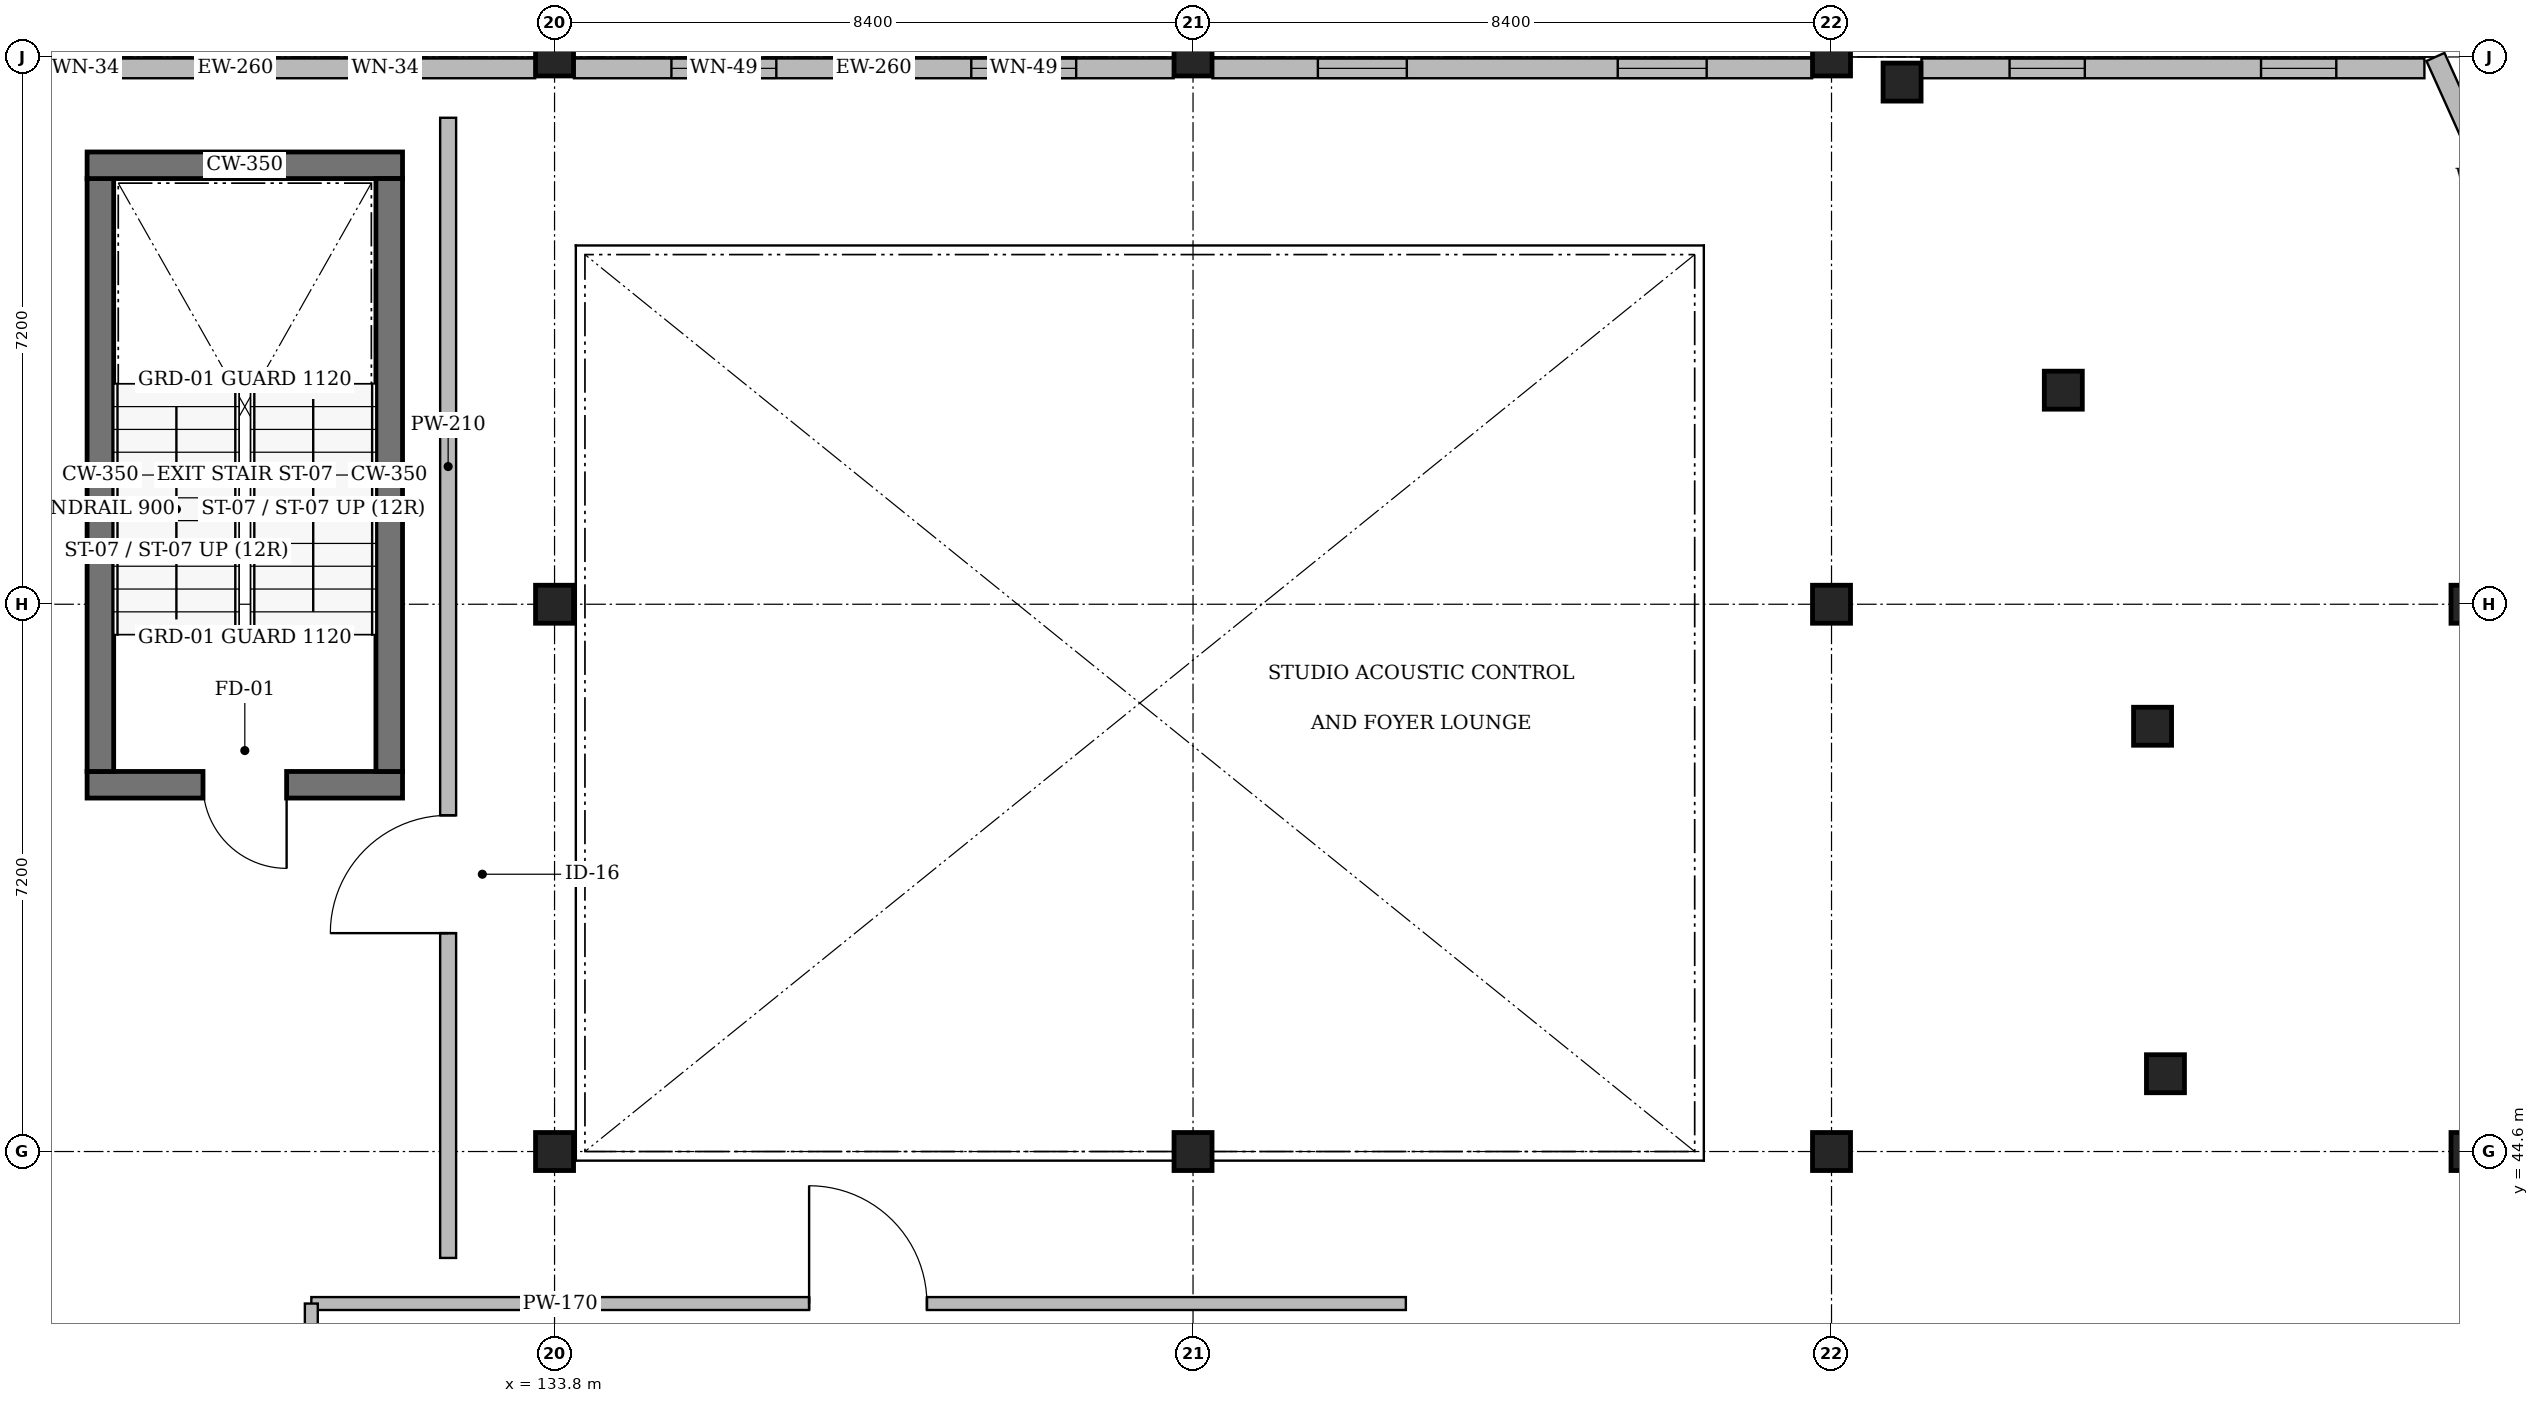
"""IFC4 building model, lengths in metres.
Left out: names, types, materials, properties, quantities, classifications, styles, units other than length and angle.
Written with IfcOpenShell. Run it as: python <this file> out.ifc"""

import sys

from ifc_helpers import new_model, si_unit, direction, frame, frame_2d, origin, origin_2d, place, context, subcontext, project, spatial, rectangle, extrude, element, fill, save


model = new_model("IFC4")
c1 = context("Model", 3, precision=1e-05, world=origin(), true_north=direction((0.0, 1.0)))
c2 = subcontext(c1, "Body", "Model", "MODEL_VIEW")
j1 = project(units=[si_unit("LENGTHUNIT", "METRE"), si_unit("PLANEANGLEUNIT", "RADIAN")], contexts=[c1])
p1 = place(None, origin())
s1 = spatial("IfcSite", under=j1, at=p1, CompositionType="ELEMENT")
p2 = place(p1, origin())
s2 = spatial("IfcBuilding", under=s1, at=p2, CompositionType="ELEMENT")
p3 = place(p2, frame((0.0, 0.0, 4.8)))
s3 = spatial("IfcBuildingStorey", under=s2, at=p3, CompositionType="ELEMENT", Elevation=4.8)
for number, where, z_axis, x_axis in (
    (1, (133.8, 44.6, 0.0), (0.0, 0.0, 1.0), (1.0, 0.0, 0.0)),
    (2, (133.8, 51.8, 0.0), (0.0, 0.0, 1.0), (1.0, 0.0, 0.0)),
    (3, (133.8, 59.0, 0.0), (0.0, 0.0, 1.0), (1.0, 0.0, 0.0)),
    (4, (142.2, 44.6, 0.0), (0.0, 0.0, 1.0), (1.0, 0.0, 0.0)),
    (5, (142.2, 59.0, 0.0), (0.0, 0.0, 1.0), (1.0, 0.0, 0.0)),
    (6, (150.6, 44.6, 0.0), (0.0, 0.0, 1.0), (1.0, 0.0, 0.0)),
    (7, (150.6, 51.8, 0.0), (0.0, 0.0, 1.0), (1.0, 0.0, 0.0)),
    (8, (150.6, 59.0, 0.0), (0.0, 0.0, 1.0), (1.0, 0.0, 0.0)),
    (9, (159.0, 44.6, 0.0), (0.0, 0.0, 1.0), (1.0, 0.0, 0.0)),
    (10, (159.0, 51.8, 0.0), (0.0, 0.0, 1.0), (1.0, 0.0, 0.0)),
    (11, (151.528, 58.669, 0.0), (0.0, 0.0, 1.0), (1.0, 0.0, 0.0)),
    (12, (153.649, 54.616, 0.0), (0.0, 0.0, 1.0), (1.0, 0.0, 0.0)),
    (13, (154.824, 50.195, 0.0), (0.0, 0.0, 1.0), (1.0, 0.0, 0.0)),
    (14, (154.993, 45.623, 0.0), (0.0, 0.0, 1.0), (1.0, 0.0, 0.0)),
):
    element("IfcColumn", number, at=place(p3, frame(where, z_axis=z_axis, x_axis=x_axis)), inside=s3, PredefinedType="COLUMN", context=c2, shape_type="SweptSolid", body=[
        extrude(rectangle(XDim=0.5, YDim=0.5, at=origin_2d()), origin(), (0.0, 0.0, 1.0), 4.2),
    ])
p4 = place(p3, frame((131.8, 49.425, 0.0), z_axis=(0.0, 0.0, 1.0), x_axis=(-1.0, 0.0, 0.0)))
e15 = element("IfcWall", 15, at=p4, inside=s3, PredefinedType="SOLIDWALL", context=c2, shape_type="SweptSolid", body=[
    extrude(rectangle(XDim=4.15, YDim=0.35, at=frame_2d((2.075, 0.0))), origin(), (0.0, 0.0, 1.0), 4.2),
])
p5 = place(p4, frame((1.525, 0.0, 0.0)))
e16 = element("IfcOpeningElement", 16, at=p5, cuts=e15, PredefinedType="OPENING", context=c2, shape_type="SweptSolid", body=[
    extrude(rectangle(XDim=1.1, YDim=2.15, at=frame_2d((0.55, 1.075))), frame((0.0, 0.195, 0.0), z_axis=(0.0, -1.0, 0.0), x_axis=(1.0, 0.0, 0.0)), (0.0, 0.0, 1.0), 0.39),
])
p6 = place(p3, frame((127.825, 49.6, 0.0), z_axis=(0.0, 0.0, 1.0), x_axis=(0.0, 1.0, 0.0)))
e17 = element("IfcWall", 17, at=p6, inside=s3, PredefinedType="SOLIDWALL", context=c2, shape_type="SweptSolid", body=[
    extrude(rectangle(XDim=7.8, YDim=0.35, at=frame_2d((3.9, 0.0))), origin(), (0.0, 0.0, 1.0), 4.2),
])
p7 = place(p3, frame((127.65, 57.575, 0.0), z_axis=(0.0, 0.0, 1.0), x_axis=(1.0, 0.0, 0.0)))
e18 = element("IfcWall", 18, at=p7, inside=s3, PredefinedType="SOLIDWALL", context=c2, shape_type="SweptSolid", body=[
    extrude(rectangle(XDim=4.15, YDim=0.35, at=frame_2d((2.075, 0.0))), origin(), (0.0, 0.0, 1.0), 4.2),
])
p8 = place(p3, frame((131.625, 57.4, 0.0), z_axis=(0.0, 0.0, 1.0), x_axis=(0.0, -1.0, 0.0)))
e19 = element("IfcWall", 19, at=p8, inside=s3, PredefinedType="SOLIDWALL", context=c2, shape_type="SweptSolid", body=[
    extrude(rectangle(XDim=7.8, YDim=0.35, at=frame_2d((3.9, 0.0))), origin(), (0.0, 0.0, 1.0), 4.2),
])
p9 = place(p3, frame((161.385, 52.7, 0.0), z_axis=(0.0, 0.0, 1.0), x_axis=(-0.410843511641, 0.911705878528, 0.0)))
e20 = element("IfcWall", 20, at=p9, inside=s3, PredefinedType="SOLIDWALL", context=c2, shape_type="SweptSolid", body=[
    extrude(rectangle(XDim=6.91, YDim=0.26, at=frame_2d((3.455, 0.0))), origin(), (0.0, 0.0, 1.0), 3.94),
])
p10 = place(p9, frame((1.068, 0.0, 0.95)))
e21 = element("IfcOpeningElement", 21, at=p10, cuts=e20, PredefinedType="OPENING", context=c2, shape_type="SweptSolid", body=[
    extrude(rectangle(XDim=1.32, YDim=1.9, at=frame_2d((0.66, 0.95))), frame((0.0, 0.15, 0.0), z_axis=(0.0, -1.0, 0.0), x_axis=(1.0, 0.0, 0.0)), (0.0, 0.0, 1.0), 0.3),
])
p11 = place(p9, frame((4.523, 0.0, 0.95)))
e22 = element("IfcOpeningElement", 22, at=p11, cuts=e20, PredefinedType="OPENING", context=c2, shape_type="SweptSolid", body=[
    extrude(rectangle(XDim=1.32, YDim=1.9, at=frame_2d((0.66, 0.95))), frame((0.0, 0.15, 0.0), z_axis=(0.0, -1.0, 0.0), x_axis=(1.0, 0.0, 0.0)), (0.0, 0.0, 1.0), 0.3),
])
p12 = place(p3, frame((125.655, 58.85, 0.0), z_axis=(0.0, 0.0, 1.0), x_axis=(1.0, 0.0, 0.0)))
e23 = element("IfcWall", 23, at=p12, inside=s3, PredefinedType="SOLIDWALL", context=c2, shape_type="SweptSolid", body=[
    extrude(rectangle(XDim=7.89, YDim=0.26, at=frame_2d((3.945, 0.0))), origin(), (0.0, 0.0, 1.0), 3.273),
])
p13 = place(p12, frame((1.508, 0.0, 0.95)))
e24 = element("IfcOpeningElement", 24, at=p13, cuts=e23, PredefinedType="OPENING", context=c2, shape_type="SweptSolid", body=[
    extrude(rectangle(XDim=0.93, YDim=1.55, at=frame_2d((0.465, 0.775))), frame((0.0, 0.15, 0.0), z_axis=(0.0, -1.0, 0.0), x_axis=(1.0, 0.0, 0.0)), (0.0, 0.0, 1.0), 0.3),
])
p14 = place(p12, frame((5.452, 0.0, 0.95)))
e25 = element("IfcOpeningElement", 25, at=p14, cuts=e23, PredefinedType="OPENING", context=c2, shape_type="SweptSolid", body=[
    extrude(rectangle(XDim=0.93, YDim=1.55, at=frame_2d((0.465, 0.775))), frame((0.0, 0.15, 0.0), z_axis=(0.0, -1.0, 0.0), x_axis=(1.0, 0.0, 0.0)), (0.0, 0.0, 1.0), 0.3),
])
p15 = place(p3, frame((134.055, 58.85, 0.0), z_axis=(0.0, 0.0, 1.0), x_axis=(1.0, 0.0, 0.0)))
e26 = element("IfcWall", 26, at=p15, inside=s3, PredefinedType="SOLIDWALL", context=c2, shape_type="SweptSolid", body=[
    extrude(rectangle(XDim=7.89, YDim=0.26, at=frame_2d((3.945, 0.0))), origin(), (0.0, 0.0, 1.0), 3.273),
])
p16 = place(p15, frame((1.282, 0.0, 0.95)))
e27 = element("IfcOpeningElement", 27, at=p16, cuts=e26, PredefinedType="OPENING", context=c2, shape_type="SweptSolid", body=[
    extrude(rectangle(XDim=1.38, YDim=1.7, at=frame_2d((0.69, 0.85))), frame((0.0, 0.15, 0.0), z_axis=(0.0, -1.0, 0.0), x_axis=(1.0, 0.0, 0.0)), (0.0, 0.0, 1.0), 0.3),
])
p17 = place(p15, frame((5.228, 0.0, 0.95)))
e28 = element("IfcOpeningElement", 28, at=p17, cuts=e26, PredefinedType="OPENING", context=c2, shape_type="SweptSolid", body=[
    extrude(rectangle(XDim=1.38, YDim=1.7, at=frame_2d((0.69, 0.85))), frame((0.0, 0.15, 0.0), z_axis=(0.0, -1.0, 0.0), x_axis=(1.0, 0.0, 0.0)), (0.0, 0.0, 1.0), 0.3),
])
p18 = place(p3, frame((142.455, 58.85, 0.0), z_axis=(0.0, 0.0, 1.0), x_axis=(1.0, 0.0, 0.0)))
e29 = element("IfcWall", 29, at=p18, inside=s3, PredefinedType="SOLIDWALL", context=c2, shape_type="SweptSolid", body=[
    extrude(rectangle(XDim=7.89, YDim=0.26, at=frame_2d((3.945, 0.0))), origin(), (0.0, 0.0, 1.0), 3.273),
])
p19 = place(p18, frame((1.387, 0.0, 0.95)))
e30 = element("IfcOpeningElement", 30, at=p19, cuts=e29, PredefinedType="OPENING", context=c2, shape_type="SweptSolid", body=[
    extrude(rectangle(XDim=1.17, YDim=1.85, at=frame_2d((0.585, 0.925))), frame((0.0, 0.15, 0.0), z_axis=(0.0, -1.0, 0.0), x_axis=(1.0, 0.0, 0.0)), (0.0, 0.0, 1.0), 0.3),
])
p20 = place(p18, frame((5.333, 0.0, 0.95)))
e31 = element("IfcOpeningElement", 31, at=p20, cuts=e29, PredefinedType="OPENING", context=c2, shape_type="SweptSolid", body=[
    extrude(rectangle(XDim=1.17, YDim=1.85, at=frame_2d((0.585, 0.925))), frame((0.0, 0.15, 0.0), z_axis=(0.0, -1.0, 0.0), x_axis=(1.0, 0.0, 0.0)), (0.0, 0.0, 1.0), 0.3),
])
p21 = place(p3, frame((151.783, 58.85, 0.0), z_axis=(0.0, 0.0, 1.0), x_axis=(1.0, 0.0, 0.0)))
e32 = element("IfcWall", 32, at=p21, inside=s3, PredefinedType="SOLIDWALL", context=c2, shape_type="SweptSolid", body=[
    extrude(rectangle(XDim=6.617, YDim=0.26, at=frame_2d((3.308, 0.0))), origin(), (0.0, 0.0, 1.0), 3.94),
])
p22 = place(p21, frame((1.159, 0.0, 0.95)))
e33 = element("IfcOpeningElement", 33, at=p22, cuts=e32, PredefinedType="OPENING", context=c2, shape_type="SweptSolid", body=[
    extrude(rectangle(XDim=0.99, YDim=1.55, at=frame_2d((0.495, 0.775))), frame((0.0, 0.15, 0.0), z_axis=(0.0, -1.0, 0.0), x_axis=(1.0, 0.0, 0.0)), (0.0, 0.0, 1.0), 0.3),
])
p23 = place(p21, frame((4.468, 0.0, 0.95)))
e34 = element("IfcOpeningElement", 34, at=p23, cuts=e32, PredefinedType="OPENING", context=c2, shape_type="SweptSolid", body=[
    extrude(rectangle(XDim=0.99, YDim=1.55, at=frame_2d((0.495, 0.775))), frame((0.0, 0.15, 0.0), z_axis=(0.0, -1.0, 0.0), x_axis=(1.0, 0.0, 0.0)), (0.0, 0.0, 1.0), 0.3),
])
p24 = place(p3, frame((130.6, 42.6, 0.0), z_axis=(0.0, 0.0, 1.0), x_axis=(1.0, 0.0, 0.0)))
e35 = element("IfcWall", 35, at=p24, inside=s3, PredefinedType="PARTITIONING", context=c2, shape_type="SweptSolid", body=[
    extrude(rectangle(XDim=14.4, YDim=0.17, at=frame_2d((7.2, 0.0))), origin(), (0.0, 0.0, 1.0), 3.94),
])
p25 = place(p24, frame((6.549, 0.0, 0.0)))
e36 = element("IfcOpeningElement", 36, at=p25, cuts=e35, PredefinedType="OPENING", context=c2, shape_type="SweptSolid", body=[
    extrude(rectangle(XDim=1.55, YDim=2.2, at=frame_2d((0.775, 1.1))), frame((0.0, 0.105, 0.0), z_axis=(0.0, -1.0, 0.0), x_axis=(1.0, 0.0, 0.0)), (0.0, 0.0, 1.0), 0.21),
])
p26 = place(p3, frame((130.6, 24.0, 0.0), z_axis=(0.0, 0.0, 1.0), x_axis=(0.0, 1.0, 0.0)))
e37 = element("IfcWall", 37, at=p26, inside=s3, PredefinedType="PARTITIONING", context=c2, shape_type="SweptSolid", body=[
    extrude(rectangle(XDim=18.6, YDim=0.17, at=frame_2d((9.3, 0.0))), origin(), (0.0, 0.0, 1.0), 3.94),
])
p27 = place(p3, frame((132.4, 43.2, 0.0), z_axis=(0.0, 0.0, 1.0), x_axis=(0.0, 1.0, 0.0)))
e38 = element("IfcWall", 38, at=p27, inside=s3, PredefinedType="PARTITIONING", context=c2, shape_type="SweptSolid", body=[
    extrude(rectangle(XDim=15.0, YDim=0.21, at=frame_2d((7.5, 0.0))), origin(), (0.0, 0.0, 1.0), 3.94),
])
p28 = place(p27, frame((4.273, 0.0, 0.0)))
e39 = element("IfcOpeningElement", 39, at=p28, cuts=e38, PredefinedType="OPENING", context=c2, shape_type="SweptSolid", body=[
    extrude(rectangle(XDim=1.55, YDim=2.2, at=frame_2d((0.775, 1.1))), frame((0.0, 0.125, 0.0), z_axis=(0.0, -1.0, 0.0), x_axis=(1.0, 0.0, 0.0)), (0.0, 0.0, 1.0), 0.25),
])
p29 = place(p5, origin())
e40 = element("IfcDoor", 40, at=p29, inside=s3, OperationType="SINGLE_SWING_LEFT", PredefinedType="DOOR", context=c2, shape_type="SweptSolid", body=[
    extrude(rectangle(XDim=1.1, YDim=2.15, at=frame_2d((0.55, 1.075))), frame((0.0, 0.025, 0.0), z_axis=(0.0, -1.0, 0.0), x_axis=(1.0, 0.0, 0.0)), (0.0, 0.0, 1.0), 0.05),
])
fill(e16, e40)
p30 = place(p13, origin())
e41 = element("IfcWindow", 41, at=p30, inside=s3, PartitioningType="SINGLE_PANEL", PredefinedType="WINDOW", context=c2, shape_type="SweptSolid", body=[
    extrude(rectangle(XDim=0.93, YDim=1.55, at=frame_2d((0.465, 0.775))), frame((0.0, 0.03, 0.0), z_axis=(0.0, -1.0, 0.0), x_axis=(1.0, 0.0, 0.0)), (0.0, 0.0, 1.0), 0.06),
])
fill(e24, e41)
p31 = place(p14, origin())
e42 = element("IfcWindow", 42, at=p31, inside=s3, PartitioningType="SINGLE_PANEL", PredefinedType="WINDOW", context=c2, shape_type="SweptSolid", body=[
    extrude(rectangle(XDim=0.93, YDim=1.55, at=frame_2d((0.465, 0.775))), frame((0.0, 0.03, 0.0), z_axis=(0.0, -1.0, 0.0), x_axis=(1.0, 0.0, 0.0)), (0.0, 0.0, 1.0), 0.06),
])
fill(e25, e42)
p32 = place(p16, origin())
e43 = element("IfcWindow", 43, at=p32, inside=s3, PartitioningType="SINGLE_PANEL", PredefinedType="WINDOW", context=c2, shape_type="SweptSolid", body=[
    extrude(rectangle(XDim=1.38, YDim=1.7, at=frame_2d((0.69, 0.85))), frame((0.0, 0.03, 0.0), z_axis=(0.0, -1.0, 0.0), x_axis=(1.0, 0.0, 0.0)), (0.0, 0.0, 1.0), 0.06),
])
fill(e27, e43)
p33 = place(p17, origin())
e44 = element("IfcWindow", 44, at=p33, inside=s3, PartitioningType="SINGLE_PANEL", PredefinedType="WINDOW", context=c2, shape_type="SweptSolid", body=[
    extrude(rectangle(XDim=1.38, YDim=1.7, at=frame_2d((0.69, 0.85))), frame((0.0, 0.03, 0.0), z_axis=(0.0, -1.0, 0.0), x_axis=(1.0, 0.0, 0.0)), (0.0, 0.0, 1.0), 0.06),
])
fill(e28, e44)
p34 = place(p19, origin())
e45 = element("IfcWindow", 45, at=p34, inside=s3, PartitioningType="SINGLE_PANEL", PredefinedType="WINDOW", context=c2, shape_type="SweptSolid", body=[
    extrude(rectangle(XDim=1.17, YDim=1.85, at=frame_2d((0.585, 0.925))), frame((0.0, 0.03, 0.0), z_axis=(0.0, -1.0, 0.0), x_axis=(1.0, 0.0, 0.0)), (0.0, 0.0, 1.0), 0.06),
])
fill(e30, e45)
p35 = place(p20, origin())
e46 = element("IfcWindow", 46, at=p35, inside=s3, PartitioningType="SINGLE_PANEL", PredefinedType="WINDOW", context=c2, shape_type="SweptSolid", body=[
    extrude(rectangle(XDim=1.17, YDim=1.85, at=frame_2d((0.585, 0.925))), frame((0.0, 0.03, 0.0), z_axis=(0.0, -1.0, 0.0), x_axis=(1.0, 0.0, 0.0)), (0.0, 0.0, 1.0), 0.06),
])
fill(e31, e46)
p36 = place(p22, origin())
e47 = element("IfcWindow", 47, at=p36, inside=s3, PartitioningType="SINGLE_PANEL", PredefinedType="WINDOW", context=c2, shape_type="SweptSolid", body=[
    extrude(rectangle(XDim=0.99, YDim=1.55, at=frame_2d((0.495, 0.775))), frame((0.0, 0.03, 0.0), z_axis=(0.0, -1.0, 0.0), x_axis=(1.0, 0.0, 0.0)), (0.0, 0.0, 1.0), 0.06),
])
fill(e33, e47)
p37 = place(p23, origin())
e48 = element("IfcWindow", 48, at=p37, inside=s3, PartitioningType="SINGLE_PANEL", PredefinedType="WINDOW", context=c2, shape_type="SweptSolid", body=[
    extrude(rectangle(XDim=0.99, YDim=1.55, at=frame_2d((0.495, 0.775))), frame((0.0, 0.03, 0.0), z_axis=(0.0, -1.0, 0.0), x_axis=(1.0, 0.0, 0.0)), (0.0, 0.0, 1.0), 0.06),
])
fill(e34, e48)
p38 = place(p25, origin())
e49 = element("IfcDoor", 49, at=p38, inside=s3, OperationType="DOUBLE_DOOR_SINGLE_SWING", PredefinedType="DOOR", context=c2, shape_type="SweptSolid", body=[
    extrude(rectangle(XDim=1.55, YDim=2.2, at=frame_2d((0.775, 1.1))), frame((0.0, 0.025, 0.0), z_axis=(0.0, -1.0, 0.0), x_axis=(1.0, 0.0, 0.0)), (0.0, 0.0, 1.0), 0.05),
])
fill(e36, e49)
p39 = place(p28, origin())
e50 = element("IfcDoor", 50, at=p39, inside=s3, OperationType="DOUBLE_DOOR_SINGLE_SWING", PredefinedType="DOOR", context=c2, shape_type="SweptSolid", body=[
    extrude(rectangle(XDim=1.55, YDim=2.2, at=frame_2d((0.775, 1.1))), frame((0.0, 0.025, 0.0), z_axis=(0.0, -1.0, 0.0), x_axis=(1.0, 0.0, 0.0)), (0.0, 0.0, 1.0), 0.05),
])
fill(e39, e50)
save(model, sys.argv[1])
